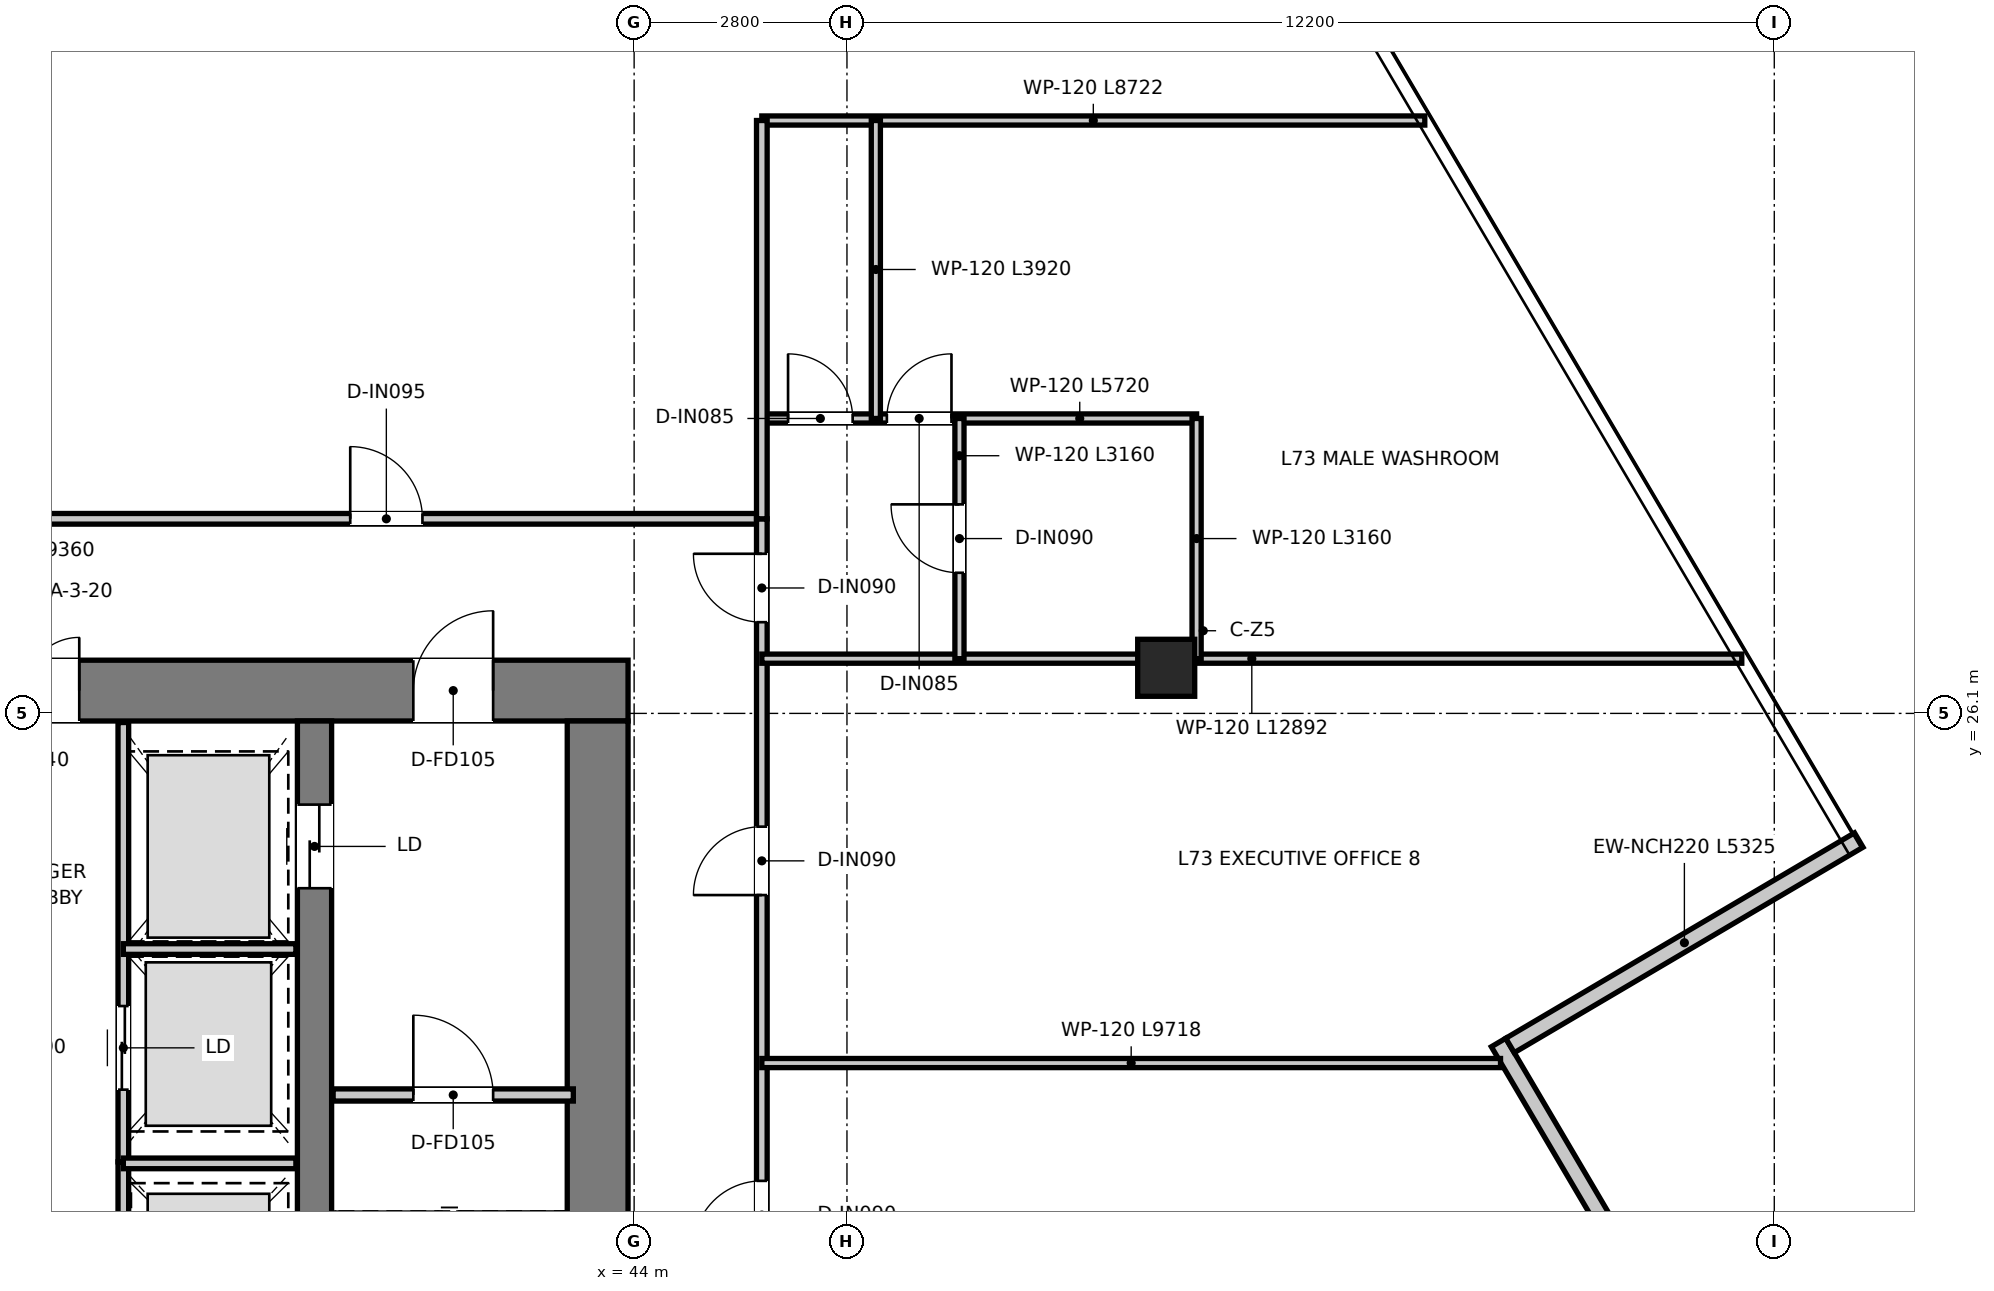
"""IFC4 building model, lengths in metres.
Left out: names, types, materials, properties, quantities, classifications, styles, units other than length and angle.
Written with IfcOpenShell. Run it as: python <this file> out.ifc"""

import sys

from ifc_helpers import new_model, si_unit, direction, frame, frame_2d, origin, origin_2d, place, context, subcontext, project, spatial, rectangle, extrude, source, transform, mapped, element, fill, save


model = new_model("IFC4")
c1 = context("Model", 3, precision=1e-05, world=origin(), true_north=direction((0.0, 1.0)))
c2 = subcontext(c1, "Body", "Model", "MODEL_VIEW")
j1 = project(units=[si_unit("LENGTHUNIT", "METRE"), si_unit("PLANEANGLEUNIT", "RADIAN")], contexts=[c1])
p1 = place(None, origin())
s1 = spatial("IfcSite", under=j1, at=p1, CompositionType="ELEMENT")
p2 = place(p1, origin())
s2 = spatial("IfcBuilding", under=s1, at=p2, CompositionType="ELEMENT")
p3 = place(p2, frame((0.0, 0.0, 299.0)))
s3 = spatial("IfcBuildingStorey", under=s2, at=p3, CompositionType="ELEMENT", Elevation=299.0)
p4 = place(p3, frame((28.08, 26.4, 0.0), z_axis=(0.0, 0.0, 1.0), x_axis=(1.0, 0.0, 0.0)))
e1 = element("IfcWall", 1, at=p4, inside=s3, PredefinedType="SHEAR", context=c2, shape_type="SweptSolid", body=[
    extrude(rectangle(XDim=15.84, YDim=0.8, at=frame_2d((7.92, 0.0))), origin(), (0.0, 0.0, 1.0), 3.95),
])
p5 = place(p4, frame((7.22, 0.0, 0.0)))
e2 = element("IfcOpeningElement", 2, at=p5, cuts=e1, PredefinedType="OPENING", context=c2, shape_type="SweptSolid", body=[
    extrude(rectangle(XDim=1.4, YDim=2.2, at=frame_2d((0.7, 1.1))), frame((0.0, 0.41, 0.0), z_axis=(0.0, -1.0, 0.0), x_axis=(1.0, 0.0, 0.0)), (0.0, 0.0, 1.0), 0.82),
])
p6 = place(p4, frame((1.775, 0.0, 0.0)))
e3 = element("IfcOpeningElement", 3, at=p6, cuts=e1, PredefinedType="OPENING", context=c2, shape_type="SweptSolid", body=[
    extrude(rectangle(XDim=1.05, YDim=2.1, at=frame_2d((0.525, 1.05))), frame((0.0, 0.41, 0.0), z_axis=(0.0, -1.0, 0.0), x_axis=(1.0, 0.0, 0.0)), (0.0, 0.0, 1.0), 0.82),
])
p7 = place(p4, frame((13.015, 0.0, 0.0)))
e4 = element("IfcOpeningElement", 4, at=p7, cuts=e1, PredefinedType="OPENING", context=c2, shape_type="SweptSolid", body=[
    extrude(rectangle(XDim=1.05, YDim=2.1, at=frame_2d((0.525, 1.05))), frame((0.0, 0.41, 0.0), z_axis=(0.0, -1.0, 0.0), x_axis=(1.0, 0.0, 0.0)), (0.0, 0.0, 1.0), 0.82),
])
p8 = place(p3, frame((43.52, 11.3, 0.0), z_axis=(0.0, 0.0, 1.0), x_axis=(0.0, 1.0, 0.0)))
e5 = element("IfcWall", 5, at=p8, inside=s3, PredefinedType="SHEAR", context=c2, shape_type="SweptSolid", body=[
    extrude(rectangle(XDim=14.7, YDim=0.8, at=frame_2d((7.35, 0.0))), origin(), (0.0, 0.0, 1.0), 3.95),
])
p9 = place(p3, frame((39.795, 13.22, 0.0), z_axis=(0.0, 0.0, 1.0), x_axis=(0.0, 1.0, 0.0)))
e6 = element("IfcWall", 6, at=p9, inside=s3, PredefinedType="SHEAR", context=c2, shape_type="SweptSolid", body=[
    extrude(rectangle(XDim=12.78, YDim=0.45, at=frame_2d((6.39, 0.0))), origin(), (0.0, 0.0, 1.0), 3.95),
])
p10 = place(p9, frame((10.58, 0.0, 0.0)))
e7 = element("IfcOpeningElement", 7, at=p10, cuts=e6, PredefinedType="OPENING", context=c2, shape_type="SweptSolid", body=[
    extrude(rectangle(XDim=1.1, YDim=2.15, at=frame_2d((0.55, 1.075))), frame((0.0, 0.235, 0.0), z_axis=(0.0, -1.0, 0.0), x_axis=(1.0, 0.0, 0.0)), (0.0, 0.0, 1.0), 0.47),
])
m1 = source(origin(), c2, "Body", "SweptSolid", [
    extrude(rectangle(XDim=0.75, YDim=0.75, at=origin_2d()), origin(), (0.0, 0.0, 1.0), 3.95),
])
p11 = place(p3, frame((51.0, 26.7, 0.0), z_axis=(0.0, 0.0, 1.0), x_axis=(1.0, 0.0, 0.0)))
e8 = element("IfcColumn", 8, at=p11, inside=s3, PredefinedType="COLUMN", context=c2, shape_type="MappedRepresentation", body=[
    mapped(m1, transform((0.0, 0.0, 0.0), x_axis=(1.0, 0.0, 0.0), y_axis=(0.0, 1.0, 0.0), z_axis=(0.0, 0.0, 1.0), scale=1.0)),
])
p12 = place(p3, frame((58.187, 16.992, 0.0), z_axis=(0.0, 0.0, 1.0), x_axis=(-0.507551078836, 0.861621670092, 0.0)))
e9 = element("IfcWall", 9, at=p12, inside=s3, PredefinedType="ELEMENTEDWALL", context=c2, shape_type="SweptSolid", body=[
    extrude(rectangle(XDim=5.545, YDim=0.22, at=frame_2d((2.772, 0.0))), origin(), (0.0, 0.0, 1.0), 3.67),
])
p13 = place(p3, frame((55.523, 21.731, 0.0), z_axis=(0.0, 0.0, 1.0), x_axis=(0.861627616465, 0.507540984104, 0.0)))
e10 = element("IfcWall", 10, at=p13, inside=s3, PredefinedType="ELEMENTEDWALL", context=c2, shape_type="SweptSolid", body=[
    extrude(rectangle(XDim=5.325, YDim=0.22, at=frame_2d((2.663, 0.0))), origin(), (0.0, 0.0, 1.0), 3.67),
])
p14 = place(p3, frame((40.04, 21.08, 0.0), z_axis=(0.0, 0.0, 1.0), x_axis=(1.0, 0.0, 0.0)))
e11 = element("IfcWall", 11, at=p14, inside=s3, PredefinedType="PARTITIONING", context=c2, shape_type="SweptSolid", body=[
    extrude(rectangle(XDim=3.16, YDim=0.16, at=frame_2d((1.58, 0.0))), origin(), (0.0, 0.0, 1.0), 3.67),
])
p15 = place(p14, frame((1.055, 0.0, 0.0)))
e12 = element("IfcOpeningElement", 12, at=p15, cuts=e11, PredefinedType="OPENING", context=c2, shape_type="SweptSolid", body=[
    extrude(rectangle(XDim=1.05, YDim=2.1, at=frame_2d((0.525, 1.05))), frame((0.0, 0.09, 0.0), z_axis=(0.0, -1.0, 0.0), x_axis=(1.0, 0.0, 0.0)), (0.0, 0.0, 1.0), 0.18),
])
p16 = place(p3, frame((37.28, 20.2, 0.0), z_axis=(0.0, 0.0, 1.0), x_axis=(0.0, 1.0, 0.0)))
e13 = element("IfcWall", 13, at=p16, inside=s3, PredefinedType="PARTITIONING", context=c2, shape_type="SweptSolid", body=[
    extrude(rectangle(XDim=5.78, YDim=0.14, at=frame_2d((2.89, 0.0))), origin(), (0.0, 0.0, 1.0), 2.82),
])
p17 = place(p16, frame((0.95, 0.0, 0.0)))
e14 = element("IfcOpeningElement", 14, at=p17, cuts=e13, PredefinedType="OPENING", context=c2, shape_type="SweptSolid", body=[
    extrude(rectangle(XDim=1.1, YDim=2.15, at=frame_2d((0.55, 1.075))), frame((0.0, 0.08, 0.0), z_axis=(0.0, -1.0, 0.0), x_axis=(1.0, 0.0, 0.0)), (0.0, 0.0, 1.0), 0.16),
])
p18 = place(p3, frame((37.28, 23.0, 0.0), z_axis=(0.0, 0.0, 1.0), x_axis=(1.0, 0.0, 0.0)))
e15 = element("IfcWall", 15, at=p18, inside=s3, PredefinedType="PARTITIONING", context=c2, shape_type="SweptSolid", body=[
    extrude(rectangle(XDim=2.27, YDim=0.14, at=frame_2d((1.135, 0.0))), origin(), (0.0, 0.0, 1.0), 2.82),
])
p19 = place(p3, frame((37.28, 17.78, 0.0), z_axis=(0.0, 0.0, 1.0), x_axis=(0.0, 1.0, 0.0)))
e16 = element("IfcWall", 16, at=p19, inside=s3, PredefinedType="PARTITIONING", context=c2, shape_type="SweptSolid", body=[
    extrude(rectangle(XDim=2.42, YDim=0.14, at=frame_2d((1.21, 0.0))), origin(), (0.0, 0.0, 1.0), 3.67),
])
p20 = place(p19, frame((0.55, 0.0, 0.0)))
e17 = element("IfcOpeningElement", 17, at=p20, cuts=e16, PredefinedType="OPENING", context=c2, shape_type="SweptSolid", body=[
    extrude(rectangle(XDim=1.1, YDim=2.15, at=frame_2d((0.55, 1.075))), frame((0.0, 0.08, 0.0), z_axis=(0.0, -1.0, 0.0), x_axis=(1.0, 0.0, 0.0)), (0.0, 0.0, 1.0), 0.16),
])
p21 = place(p3, frame((37.28, 20.18, 0.0), z_axis=(0.0, 0.0, 1.0), x_axis=(1.0, 0.0, 0.0)))
e18 = element("IfcWall", 18, at=p21, inside=s3, PredefinedType="PARTITIONING", context=c2, shape_type="SweptSolid", body=[
    extrude(rectangle(XDim=2.27, YDim=0.14, at=frame_2d((1.135, 0.0))), origin(), (0.0, 0.0, 1.0), 3.67),
])
p22 = place(p3, frame((26.32, 28.66, 0.0), z_axis=(0.0, 0.0, 1.0), x_axis=(1.0, 0.0, 0.0)))
e19 = element("IfcWall", 19, at=p22, inside=s3, PredefinedType="PARTITIONING", context=c2, shape_type="SweptSolid", body=[
    extrude(rectangle(XDim=19.36, YDim=0.14, at=frame_2d((9.68, 0.0))), origin(), (0.0, 0.0, 1.0), 3.18),
])
p23 = place(p22, frame((4.265, 0.0, 0.0)))
e20 = element("IfcOpeningElement", 20, at=p23, cuts=e19, PredefinedType="OPENING", context=c2, shape_type="SweptSolid", body=[
    extrude(rectangle(XDim=0.95, YDim=2.1, at=frame_2d((0.475, 1.05))), frame((0.0, 0.08, 0.0), z_axis=(0.0, -1.0, 0.0), x_axis=(1.0, 0.0, 0.0)), (0.0, 0.0, 1.0), 0.16),
])
p24 = place(p22, frame((13.945, 0.0, 0.0)))
e21 = element("IfcOpeningElement", 21, at=p24, cuts=e19, PredefinedType="OPENING", context=c2, shape_type="SweptSolid", body=[
    extrude(rectangle(XDim=0.95, YDim=2.1, at=frame_2d((0.475, 1.05))), frame((0.0, 0.08, 0.0), z_axis=(0.0, -1.0, 0.0), x_axis=(1.0, 0.0, 0.0)), (0.0, 0.0, 1.0), 0.16),
])
p25 = place(p3, frame((45.68, 9.759, 0.0), z_axis=(0.0, 0.0, 1.0), x_axis=(0.0, 1.0, 0.0)))
e22 = element("IfcWall", 22, at=p25, inside=s3, PredefinedType="PARTITIONING", context=c2, shape_type="SweptSolid", body=[
    extrude(rectangle(XDim=18.901, YDim=0.14, at=frame_2d((9.451, 0.0))), origin(), (0.0, 0.0, 1.0), 3.13),
])
p26 = place(p25, frame((17.541, 0.0, 0.0)))
e23 = element("IfcOpeningElement", 23, at=p26, cuts=e22, PredefinedType="OPENING", context=c2, shape_type="SweptSolid", body=[
    extrude(rectangle(XDim=0.9, YDim=2.1, at=frame_2d((0.45, 1.05))), frame((0.0, 0.08, 0.0), z_axis=(0.0, -1.0, 0.0), x_axis=(1.0, 0.0, 0.0)), (0.0, 0.0, 1.0), 0.16),
])
p27 = place(p25, frame((9.291, 0.0, 0.0)))
e24 = element("IfcOpeningElement", 24, at=p27, cuts=e22, PredefinedType="OPENING", context=c2, shape_type="SweptSolid", body=[
    extrude(rectangle(XDim=0.9, YDim=2.1, at=frame_2d((0.45, 1.05))), frame((0.0, 0.08, 0.0), z_axis=(0.0, -1.0, 0.0), x_axis=(1.0, 0.0, 0.0)), (0.0, 0.0, 1.0), 0.16),
])
p28 = place(p25, frame((13.951, 0.0, 0.0)))
e25 = element("IfcOpeningElement", 25, at=p28, cuts=e22, PredefinedType="OPENING", context=c2, shape_type="SweptSolid", body=[
    extrude(rectangle(XDim=0.9, YDim=2.1, at=frame_2d((0.45, 1.05))), frame((0.0, 0.08, 0.0), z_axis=(0.0, -1.0, 0.0), x_axis=(1.0, 0.0, 0.0)), (0.0, 0.0, 1.0), 0.16),
])
p29 = place(p3, frame((45.68, 26.82, 0.0), z_axis=(0.0, 0.0, 1.0), x_axis=(1.0, 0.0, 0.0)))
e26 = element("IfcWall", 26, at=p29, inside=s3, PredefinedType="PARTITIONING", context=c2, shape_type="SweptSolid", body=[
    extrude(rectangle(XDim=12.893, YDim=0.12, at=frame_2d((6.446, 0.0))), origin(), (0.0, 0.0, 1.0), 3.13),
])
p30 = place(p3, frame((45.68, 33.9, 0.0), z_axis=(0.0, 0.0, 1.0), x_axis=(1.0, 0.0, 0.0)))
e27 = element("IfcWall", 27, at=p30, inside=s3, PredefinedType="PARTITIONING", context=c2, shape_type="SweptSolid", body=[
    extrude(rectangle(XDim=8.722, YDim=0.12, at=frame_2d((4.361, 0.0))), origin(), (0.0, 0.0, 1.0), 3.13),
])
p31 = place(p3, frame((45.68, 29.98, 0.0), z_axis=(0.0, 0.0, 1.0), x_axis=(1.0, 0.0, 0.0)))
e28 = element("IfcWall", 28, at=p31, inside=s3, PredefinedType="PARTITIONING", context=c2, shape_type="SweptSolid", body=[
    extrude(rectangle(XDim=5.72, YDim=0.12, at=frame_2d((2.86, 0.0))), origin(), (0.0, 0.0, 1.0), 3.13),
])
p32 = place(p31, frame((1.645, 0.0, 0.0)))
e29 = element("IfcOpeningElement", 29, at=p32, cuts=e28, PredefinedType="OPENING", context=c2, shape_type="SweptSolid", body=[
    extrude(rectangle(XDim=0.85, YDim=2.1, at=frame_2d((0.425, 1.05))), frame((0.0, 0.07, 0.0), z_axis=(0.0, -1.0, 0.0), x_axis=(1.0, 0.0, 0.0)), (0.0, 0.0, 1.0), 0.14),
])
p33 = place(p31, frame((0.345, 0.0, 0.0)))
e30 = element("IfcOpeningElement", 30, at=p33, cuts=e28, PredefinedType="OPENING", context=c2, shape_type="SweptSolid", body=[
    extrude(rectangle(XDim=0.85, YDim=2.1, at=frame_2d((0.425, 1.05))), frame((0.0, 0.07, 0.0), z_axis=(0.0, -1.0, 0.0), x_axis=(1.0, 0.0, 0.0)), (0.0, 0.0, 1.0), 0.14),
])
p34 = place(p3, frame((51.4, 26.82, 0.0), z_axis=(0.0, 0.0, 1.0), x_axis=(0.0, 1.0, 0.0)))
e31 = element("IfcWall", 31, at=p34, inside=s3, PredefinedType="PARTITIONING", context=c2, shape_type="SweptSolid", body=[
    extrude(rectangle(XDim=3.16, YDim=0.12, at=frame_2d((1.58, 0.0))), origin(), (0.0, 0.0, 1.0), 3.67),
])
p35 = place(p3, frame((48.28, 26.82, 0.0), z_axis=(0.0, 0.0, 1.0), x_axis=(0.0, 1.0, 0.0)))
e32 = element("IfcWall", 32, at=p35, inside=s3, PredefinedType="PARTITIONING", context=c2, shape_type="SweptSolid", body=[
    extrude(rectangle(XDim=3.16, YDim=0.12, at=frame_2d((1.58, 0.0))), origin(), (0.0, 0.0, 1.0), 3.18),
])
p36 = place(p35, frame((1.13, 0.0, 0.0)))
e33 = element("IfcOpeningElement", 33, at=p36, cuts=e32, PredefinedType="OPENING", context=c2, shape_type="SweptSolid", body=[
    extrude(rectangle(XDim=0.9, YDim=2.1, at=frame_2d((0.45, 1.05))), frame((0.0, 0.07, 0.0), z_axis=(0.0, -1.0, 0.0), x_axis=(1.0, 0.0, 0.0)), (0.0, 0.0, 1.0), 0.14),
])
p37 = place(p3, frame((47.18, 29.98, 0.0), z_axis=(0.0, 0.0, 1.0), x_axis=(0.0, 1.0, 0.0)))
e34 = element("IfcWall", 34, at=p37, inside=s3, PredefinedType="PARTITIONING", context=c2, shape_type="SweptSolid", body=[
    extrude(rectangle(XDim=3.92, YDim=0.12, at=frame_2d((1.96, 0.0))), origin(), (0.0, 0.0, 1.0), 3.31),
])
p38 = place(p3, frame((45.68, 28.66, 0.0), z_axis=(0.0, 0.0, 1.0), x_axis=(0.0, 1.0, 0.0)))
e35 = element("IfcWall", 35, at=p38, inside=s3, PredefinedType="PARTITIONING", context=c2, shape_type="SweptSolid", body=[
    extrude(rectangle(XDim=5.24, YDim=0.14, at=frame_2d((2.62, 0.0))), origin(), (0.0, 0.0, 1.0), 3.43),
])
p39 = place(p3, frame((45.68, 21.5, 0.0), z_axis=(0.0, 0.0, 1.0), x_axis=(1.0, 0.0, 0.0)))
e36 = element("IfcWall", 36, at=p39, inside=s3, PredefinedType="PARTITIONING", context=c2, shape_type="SweptSolid", body=[
    extrude(rectangle(XDim=9.719, YDim=0.12, at=frame_2d((4.859, 0.0))), origin(), (0.0, 0.0, 1.0), 3.13),
])
p40 = place(p15, origin())
e37 = element("IfcDoor", 37, at=p40, inside=s3, OperationType="SINGLE_SWING_LEFT", PredefinedType="DOOR", context=c2, shape_type="SweptSolid", body=[
    extrude(rectangle(XDim=1.05, YDim=2.1, at=frame_2d((0.525, 1.05))), frame((0.0, 0.025, 0.0), z_axis=(0.0, -1.0, 0.0), x_axis=(1.0, 0.0, 0.0)), (0.0, 0.0, 1.0), 0.05),
])
fill(e12, e37)
p41 = place(p5, origin())
e38 = element("IfcDoor", 38, at=p41, inside=s3, OperationType="DOUBLE_DOOR_SINGLE_SWING", PredefinedType="DOOR", context=c2, shape_type="SweptSolid", body=[
    extrude(rectangle(XDim=1.4, YDim=2.2, at=frame_2d((0.7, 1.1))), frame((0.0, 0.025, 0.0), z_axis=(0.0, -1.0, 0.0), x_axis=(1.0, 0.0, 0.0)), (0.0, 0.0, 1.0), 0.05),
])
fill(e2, e38)
p42 = place(p7, origin())
e39 = element("IfcDoor", 39, at=p42, inside=s3, OperationType="SINGLE_SWING_RIGHT", PredefinedType="DOOR", context=c2, shape_type="SweptSolid", body=[
    extrude(rectangle(XDim=1.05, YDim=2.1, at=frame_2d((0.525, 1.05))), frame((0.0, 0.025, 0.0), z_axis=(0.0, -1.0, 0.0), x_axis=(1.0, 0.0, 0.0)), (0.0, 0.0, 1.0), 0.05),
])
fill(e4, e39)
p43 = place(p10, origin())
e40 = element("IfcDoor", 40, at=p43, inside=s3, OperationType="DOUBLE_DOOR_SLIDING", PredefinedType="DOOR", context=c2, shape_type="SweptSolid", body=[
    extrude(rectangle(XDim=1.1, YDim=2.15, at=frame_2d((0.55, 1.075))), frame((0.0, 0.025, 0.0), z_axis=(0.0, -1.0, 0.0), x_axis=(1.0, 0.0, 0.0)), (0.0, 0.0, 1.0), 0.05),
])
fill(e7, e40)
p44 = place(p17, origin())
e41 = element("IfcDoor", 41, at=p44, inside=s3, OperationType="DOUBLE_DOOR_SLIDING", PredefinedType="DOOR", context=c2, shape_type="SweptSolid", body=[
    extrude(rectangle(XDim=1.1, YDim=2.15, at=frame_2d((0.55, 1.075))), frame((0.0, 0.025, 0.0), z_axis=(0.0, -1.0, 0.0), x_axis=(1.0, 0.0, 0.0)), (0.0, 0.0, 1.0), 0.05),
])
fill(e14, e41)
p45 = place(p26, origin())
e42 = element("IfcDoor", 42, at=p45, inside=s3, OperationType="SINGLE_SWING_RIGHT", PredefinedType="DOOR", context=c2, shape_type="SweptSolid", body=[
    extrude(rectangle(XDim=0.9, YDim=2.1, at=frame_2d((0.45, 1.05))), frame((0.0, 0.025, 0.0), z_axis=(0.0, -1.0, 0.0), x_axis=(1.0, 0.0, 0.0)), (0.0, 0.0, 1.0), 0.05),
])
fill(e23, e42)
p46 = place(p32, origin())
e43 = element("IfcDoor", 43, at=p46, inside=s3, OperationType="SINGLE_SWING_RIGHT", PredefinedType="DOOR", context=c2, shape_type="SweptSolid", body=[
    extrude(rectangle(XDim=0.85, YDim=2.1, at=frame_2d((0.425, 1.05))), frame((0.0, 0.025, 0.0), z_axis=(0.0, -1.0, 0.0), x_axis=(1.0, 0.0, 0.0)), (0.0, 0.0, 1.0), 0.05),
])
fill(e29, e43)
p47 = place(p33, origin())
e44 = element("IfcDoor", 44, at=p47, inside=s3, OperationType="SINGLE_SWING_LEFT", PredefinedType="DOOR", context=c2, shape_type="SweptSolid", body=[
    extrude(rectangle(XDim=0.85, YDim=2.1, at=frame_2d((0.425, 1.05))), frame((0.0, 0.025, 0.0), z_axis=(0.0, -1.0, 0.0), x_axis=(1.0, 0.0, 0.0)), (0.0, 0.0, 1.0), 0.05),
])
fill(e30, e44)
p48 = place(p36, origin())
e45 = element("IfcDoor", 45, at=p48, inside=s3, OperationType="SINGLE_SWING_RIGHT", PredefinedType="DOOR", context=c2, shape_type="SweptSolid", body=[
    extrude(rectangle(XDim=0.9, YDim=2.1, at=frame_2d((0.45, 1.05))), frame((0.0, 0.025, 0.0), z_axis=(0.0, -1.0, 0.0), x_axis=(1.0, 0.0, 0.0)), (0.0, 0.0, 1.0), 0.05),
])
fill(e33, e45)
p49 = place(p24, origin())
e46 = element("IfcDoor", 46, at=p49, inside=s3, OperationType="SINGLE_SWING_LEFT", PredefinedType="DOOR", context=c2, shape_type="SweptSolid", body=[
    extrude(rectangle(XDim=0.95, YDim=2.1, at=frame_2d((0.475, 1.05))), frame((0.0, 0.025, 0.0), z_axis=(0.0, -1.0, 0.0), x_axis=(1.0, 0.0, 0.0)), (0.0, 0.0, 1.0), 0.05),
])
fill(e21, e46)
p50 = place(p27, origin())
e47 = element("IfcDoor", 47, at=p50, inside=s3, OperationType="SINGLE_SWING_LEFT", PredefinedType="DOOR", context=c2, shape_type="SweptSolid", body=[
    extrude(rectangle(XDim=0.9, YDim=2.1, at=frame_2d((0.45, 1.05))), frame((0.0, 0.025, 0.0), z_axis=(0.0, -1.0, 0.0), x_axis=(1.0, 0.0, 0.0)), (0.0, 0.0, 1.0), 0.05),
])
fill(e24, e47)
p51 = place(p28, origin())
e48 = element("IfcDoor", 48, at=p51, inside=s3, OperationType="SINGLE_SWING_LEFT", PredefinedType="DOOR", context=c2, shape_type="SweptSolid", body=[
    extrude(rectangle(XDim=0.9, YDim=2.1, at=frame_2d((0.45, 1.05))), frame((0.0, 0.025, 0.0), z_axis=(0.0, -1.0, 0.0), x_axis=(1.0, 0.0, 0.0)), (0.0, 0.0, 1.0), 0.05),
])
fill(e25, e48)
save(model, sys.argv[1])
